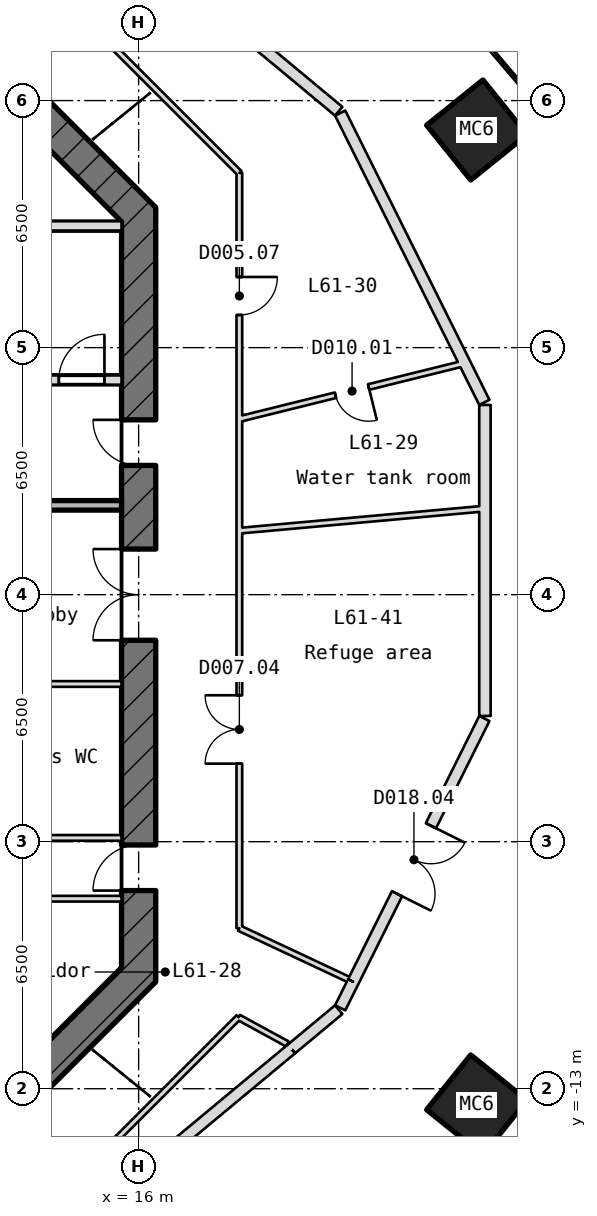
"""IFC4 building model, lengths in metres.
Left out: names, types, materials, properties, quantities, classifications, styles, units other than length and angle.
Written with IfcOpenShell. Run it as: python <this file> out.ifc"""

import sys

from ifc_helpers import new_model, si_unit, direction, frame, frame_2d, origin, place, context, subcontext, project, spatial, polyline, rectangle, outline, extrude, element, fill, save


model = new_model("IFC4")
c1 = context("Model", 3, precision=1e-05, world=origin(), true_north=direction((0.0, 1.0)))
c2 = subcontext(c1, "Body", "Model", "MODEL_VIEW")
j1 = project(units=[si_unit("LENGTHUNIT", "METRE"), si_unit("PLANEANGLEUNIT", "RADIAN")], contexts=[c1])
p1 = place(None, origin())
s1 = spatial("IfcSite", under=j1, at=p1, CompositionType="ELEMENT")
p2 = place(p1, origin())
s2 = spatial("IfcBuilding", under=s1, at=p2, CompositionType="ELEMENT")
p3 = place(p2, frame((0.0, 0.0, 273.1)))
s3 = spatial("IfcBuildingStorey", under=s2, at=p3, CompositionType="ELEMENT", Elevation=273.1)
p4 = place(p3, frame((0.0, 0.0, -0.3)))
e1 = element("IfcColumn", 1, at=p4, inside=s3, PredefinedType="COLUMN", context=c2, shape_type="SweptSolid", body=[
    extrude(outline(polyline([(28.339, 2.783), (25.704, 4.212), (25.273, 6.011), (27.121, 6.454), (29.756, 5.025), (30.186, 3.226), (28.339, 2.783)])), origin(), (0.0, 0.0, 1.0), 6.05),
])
p5 = place(p3, frame((0.0, 0.0, -0.3)))
e2 = element("IfcColumn", 2, at=p5, inside=s3, PredefinedType="COLUMN", context=c2, shape_type="SweptSolid", body=[
    extrude(outline(polyline([(24.738, 10.911), (22.17, 12.208), (21.011, 13.65), (22.491, 14.84), (25.06, 13.543), (26.219, 12.101), (24.738, 10.911)])), origin(), (0.0, 0.0, 1.0), 6.05),
])
p6 = place(p3, frame((0.0, 0.0, -0.3)))
e3 = element("IfcColumn", 3, at=p6, inside=s3, PredefinedType="COLUMN", context=c2, shape_type="SweptSolid", body=[
    extrude(outline(polyline([(25.06, -14.743), (22.491, -13.04), (21.011, -11.85), (22.17, -10.408), (24.738, -12.111), (26.219, -13.302), (25.06, -14.743)])), origin(), (0.0, 0.0, 1.0), 6.05),
])
p7 = place(p3, frame((0.0, 0.0, -0.3)))
e4 = element("IfcColumn", 4, at=p7, inside=s3, PredefinedType="COLUMN", context=c2, shape_type="SweptSolid", body=[
    extrude(outline(polyline([(29.756, -6.225), (27.908, -5.783), (25.273, -4.211), (25.704, -2.412), (27.552, -2.854), (30.186, -4.426), (29.756, -6.225)])), origin(), (0.0, 0.0, 1.0), 6.05),
])
p8 = place(p3, frame((12.868, -13.132, -0.3), z_axis=(0.0, 0.0, 1.0), x_axis=(0.707106781187, 0.707106781187, 0.0)))
e5 = element("IfcWall", 5, at=p8, inside=s3, PredefinedType="SHEAR", context=c2, shape_type="SweptSolid", body=[
    extrude(rectangle(XDim=4.615, YDim=0.9, at=frame_2d((2.308, 0.0))), origin(), (0.0, 0.0, 1.0), 6.05),
])
p9 = place(p3, frame((16.0, -10.186, -0.3), z_axis=(0.0, 0.0, 1.0), x_axis=(0.0, 1.0, 0.0)))
e6 = element("IfcWall", 6, at=p9, inside=s3, PredefinedType="SHEAR", context=c2, shape_type="SweptSolid", body=[
    extrude(rectangle(XDim=20.373, YDim=0.9, at=frame_2d((10.186, 0.0))), origin(), (0.0, 0.0, 1.0), 6.05),
])
p10 = place(p9, frame((8.986, 0.0, 0.3)))
e7 = element("IfcOpeningElement", 7, at=p10, cuts=e6, PredefinedType="OPENING", context=c2, shape_type="SweptSolid", body=[
    extrude(rectangle(XDim=2.4, YDim=2.1, at=frame_2d((1.2, 1.05))), frame((0.0, 0.46, 0.0), z_axis=(0.0, -1.0, 0.0), x_axis=(1.0, 0.0, 0.0)), (0.0, 0.0, 1.0), 0.92),
])
p11 = place(p9, frame((13.586, 0.0, 0.3)))
e8 = element("IfcOpeningElement", 8, at=p11, cuts=e6, PredefinedType="OPENING", context=c2, shape_type="SweptSolid", body=[
    extrude(rectangle(XDim=1.2, YDim=2.1, at=frame_2d((0.6, 1.05))), frame((0.0, 0.46, 0.0), z_axis=(0.0, -1.0, 0.0), x_axis=(1.0, 0.0, 0.0)), (0.0, 0.0, 1.0), 0.92),
])
p12 = place(p9, frame((2.4, 0.0, 0.3)))
e9 = element("IfcOpeningElement", 9, at=p12, cuts=e6, PredefinedType="OPENING", context=c2, shape_type="SweptSolid", body=[
    extrude(rectangle(XDim=1.2, YDim=2.1, at=frame_2d((0.6, 1.05))), frame((0.0, 0.46, 0.0), z_axis=(0.0, -1.0, 0.0), x_axis=(1.0, 0.0, 0.0)), (0.0, 0.0, 1.0), 0.92),
])
p13 = place(p3, frame((16.132, 9.868, -0.3), z_axis=(0.0, 0.0, 1.0), x_axis=(-0.707106781187, 0.707106781187, 0.0)))
e10 = element("IfcWall", 10, at=p13, inside=s3, PredefinedType="SHEAR", context=c2, shape_type="SweptSolid", body=[
    extrude(rectangle(XDim=4.615, YDim=0.9, at=frame_2d((2.308, 0.0))), origin(), (0.0, 0.0, 1.0), 6.05),
])
p14 = place(p3, frame((8.55, -8.0, 0.0), z_axis=(0.0, 0.0, 1.0), x_axis=(1.0, 0.0, 0.0)))
e11 = element("IfcWall", 11, at=p14, inside=s3, PredefinedType="PARTITIONING", context=c2, shape_type="SweptSolid", body=[
    extrude(rectangle(XDim=7.0, YDim=0.15, at=frame_2d((3.5, 0.0))), origin(), (0.0, 0.0, 1.0), 5.75),
])
p15 = place(p14, frame((2.925, 0.0, 0.0)))
e12 = element("IfcOpeningElement", 12, at=p15, cuts=e11, PredefinedType="OPENING", context=c2, shape_type="SweptSolid", body=[
    extrude(rectangle(XDim=1.0, YDim=2.1, at=frame_2d((0.5, 1.05))), frame((0.0, 0.085, 0.0), z_axis=(0.0, -1.0, 0.0), x_axis=(1.0, 0.0, 0.0)), (0.0, 0.0, 1.0), 0.17),
])
p16 = place(p3, frame((8.55, -6.4, 0.0), z_axis=(0.0, 0.0, 1.0), x_axis=(1.0, 0.0, 0.0)))
e13 = element("IfcWall", 13, at=p16, inside=s3, PredefinedType="PARTITIONING", context=c2, shape_type="SweptSolid", body=[
    extrude(rectangle(XDim=7.0, YDim=0.15, at=frame_2d((3.5, 0.0))), origin(), (0.0, 0.0, 1.0), 5.75),
])
p17 = place(p16, frame((2.925, 0.0, 0.0)))
e14 = element("IfcOpeningElement", 14, at=p17, cuts=e13, PredefinedType="OPENING", context=c2, shape_type="SweptSolid", body=[
    extrude(rectangle(XDim=1.0, YDim=2.1, at=frame_2d((0.5, 1.05))), frame((0.0, 0.085, 0.0), z_axis=(0.0, -1.0, 0.0), x_axis=(1.0, 0.0, 0.0)), (0.0, 0.0, 1.0), 0.17),
])
p18 = place(p3, frame((8.4, -2.35, 0.0), z_axis=(0.0, 0.0, 1.0), x_axis=(1.0, 0.0, 0.0)))
e15 = element("IfcWall", 15, at=p18, inside=s3, PredefinedType="PARTITIONING", context=c2, shape_type="SweptSolid", body=[
    extrude(rectangle(XDim=7.15, YDim=0.15, at=frame_2d((3.575, 0.0))), origin(), (0.0, 0.0, 1.0), 5.75),
])
p19 = place(p3, frame((8.4, 2.35, 0.0), z_axis=(0.0, 0.0, 1.0), x_axis=(1.0, 0.0, 0.0)))
e16 = element("IfcWall", 16, at=p19, inside=s3, PredefinedType="STANDARD", context=c2, shape_type="SweptSolid", body=[
    extrude(rectangle(XDim=7.15, YDim=0.25, at=frame_2d((3.575, 0.0))), origin(), (0.0, 0.0, 1.0), 5.75),
])
p20 = place(p3, frame((8.55, 5.65, -0.3), z_axis=(0.0, 0.0, 1.0), x_axis=(1.0, 0.0, 0.0)))
e17 = element("IfcWall", 17, at=p20, inside=s3, PredefinedType="SHEAR", context=c2, shape_type="SweptSolid", body=[
    extrude(rectangle(XDim=7.0, YDim=0.25, at=frame_2d((3.5, 0.0))), origin(), (0.0, 0.0, 1.0), 6.05),
])
p21 = place(p20, frame((5.35, 0.0, 0.3)))
e18 = element("IfcOpeningElement", 18, at=p21, cuts=e17, PredefinedType="OPENING", context=c2, shape_type="SweptSolid", body=[
    extrude(rectangle(XDim=1.2, YDim=2.1, at=frame_2d((0.6, 1.05))), frame((0.0, 0.135, 0.0), z_axis=(0.0, -1.0, 0.0), x_axis=(1.0, 0.0, 0.0)), (0.0, 0.0, 1.0), 0.27),
])
p22 = place(p3, frame((8.55, 9.7, -0.3), z_axis=(0.0, 0.0, 1.0), x_axis=(1.0, 0.0, 0.0)))
e19 = element("IfcWall", 19, at=p22, inside=s3, PredefinedType="SHEAR", context=c2, shape_type="SweptSolid", body=[
    extrude(rectangle(XDim=7.0, YDim=0.25, at=frame_2d((3.5, 0.0))), origin(), (0.0, 0.0, 1.0), 6.05),
])
p23 = place(p3, frame((14.161, -16.824, 0.0), z_axis=(0.0, 0.0, 1.0), x_axis=(0.769037255877, 0.639203957336, 0.0)))
e20 = element("IfcWall", 20, at=p23, inside=s3, PredefinedType="STANDARD", context=c2, shape_type="SweptSolid", body=[
    extrude(rectangle(XDim=7.621, YDim=0.3, at=frame_2d((3.811, 0.0))), origin(), (0.0, 0.0, 1.0), 5.75),
])
p24 = place(p3, frame((21.645, -10.186, 0.0), z_axis=(0.0, 0.0, 1.0), x_axis=(0.4460144846, 0.895025742382, 0.0)))
e21 = element("IfcWall", 21, at=p24, inside=s3, PredefinedType="STANDARD", context=c2, shape_type="SweptSolid", body=[
    extrude(rectangle(XDim=7.74, YDim=0.3, at=frame_2d((3.87, 0.0))), origin(), (0.0, 0.0, 1.0), 5.75),
])
p25 = place(p24, frame((2.587, 0.0, 0.0)))
e22 = element("IfcOpeningElement", 22, at=p25, cuts=e21, PredefinedType="OPENING", context=c2, shape_type="SweptSolid", body=[
    extrude(rectangle(XDim=2.0, YDim=2.1, at=frame_2d((1.0, 1.05))), frame((0.0, 0.16, 0.0), z_axis=(0.0, -1.0, 0.0), x_axis=(1.0, 0.0, 0.0)), (0.0, 0.0, 1.0), 0.32),
])
p26 = place(p3, frame((25.113, -3.192, 0.0), z_axis=(0.0, 0.0, 1.0), x_axis=(0.0, 1.0, 0.0)))
e23 = element("IfcWall", 23, at=p26, inside=s3, PredefinedType="STANDARD", context=c2, shape_type="SweptSolid", body=[
    extrude(rectangle(XDim=8.183, YDim=0.3, at=frame_2d((4.092, 0.0))), origin(), (0.0, 0.0, 1.0), 5.75),
])
p27 = place(p3, frame((25.097, 5.059, 0.0), z_axis=(0.0, 0.0, 1.0), x_axis=(-0.446030602058, 0.895017710455, 0.0)))
e24 = element("IfcWall", 24, at=p27, inside=s3, PredefinedType="STANDARD", context=c2, shape_type="SweptSolid", body=[
    extrude(rectangle(XDim=8.505, YDim=0.3, at=frame_2d((4.253, 0.0))), origin(), (0.0, 0.0, 1.0), 5.75),
])
p28 = place(p3, frame((21.265, 12.719, 0.0), z_axis=(0.0, 0.0, 1.0), x_axis=(-0.769009973498, 0.639236779809, 0.0)))
e25 = element("IfcWall", 25, at=p28, inside=s3, PredefinedType="STANDARD", context=c2, shape_type="SweptSolid", body=[
    extrude(rectangle(XDim=8.291, YDim=0.3, at=frame_2d((4.146, 0.0))), origin(), (0.0, 0.0, 1.0), 5.75),
])
p29 = place(p3, frame((20.022, -11.953, 0.0), z_axis=(0.0, 0.0, 1.0), x_axis=(0.769013258234, 0.63923282821, 0.0)))
e26 = element("IfcWall", 26, at=p29, inside=s3, PredefinedType="STANDARD", context=c2, shape_type="SweptSolid", body=[
    extrude(rectangle(XDim=1.616, YDim=0.3, at=frame_2d((0.808, 0.0))), origin(), (0.0, 0.0, 1.0), 5.75),
])
p30 = place(p3, frame((21.303, -10.871, 0.0), z_axis=(0.0, 0.0, 1.0), x_axis=(0.446193434067, 0.894936544899, 0.0)))
e27 = element("IfcWall", 27, at=p30, inside=s3, PredefinedType="STANDARD", context=c2, shape_type="SweptSolid", body=[
    extrude(rectangle(XDim=0.766, YDim=0.3, at=frame_2d((0.383, 0.0))), origin(), (0.0, 0.0, 1.0), 5.75),
])
p31 = place(p3, frame((18.65, 1.683, 0.0), z_axis=(0.0, 0.0, 1.0), x_axis=(0.995955876616, 0.089843707818, 0.0)))
e28 = element("IfcWall", 28, at=p31, inside=s3, PredefinedType="PARTITIONING", context=c2, shape_type="SweptSolid", body=[
    extrude(rectangle(XDim=6.489, YDim=0.15, at=frame_2d((3.245, 0.0))), origin(), (0.0, 0.0, 1.0), 5.75),
])
p32 = place(p3, frame((18.65, 4.621, 0.0), z_axis=(0.0, 0.0, 1.0), x_axis=(0.970650214712, 0.24049565626, 0.0)))
e29 = element("IfcWall", 29, at=p32, inside=s3, PredefinedType="PARTITIONING", context=c2, shape_type="SweptSolid", body=[
    extrude(rectangle(XDim=6.112, YDim=0.15, at=frame_2d((3.056, 0.0))), origin(), (0.0, 0.0, 1.0), 5.75),
])
p33 = place(p32, frame((2.606, 0.0, 0.0)))
e30 = element("IfcOpeningElement", 30, at=p33, cuts=e29, PredefinedType="OPENING", context=c2, shape_type="SweptSolid", body=[
    extrude(rectangle(XDim=0.9, YDim=2.1, at=frame_2d((0.45, 1.05))), frame((0.0, 0.085, 0.0), z_axis=(0.0, -1.0, 0.0), x_axis=(1.0, 0.0, 0.0)), (0.0, 0.0, 1.0), 0.17),
])
p34 = place(p3, frame((14.098, -15.65, 0.0), z_axis=(0.0, 0.0, 1.0), x_axis=(0.707106781187, 0.707106781187, 0.0)))
e31 = element("IfcWall", 31, at=p34, inside=s3, PredefinedType="PARTITIONING", context=c2, shape_type="SweptSolid", body=[
    extrude(rectangle(XDim=6.406, YDim=0.15, at=frame_2d((3.203, 0.0))), origin(), (0.0, 0.0, 1.0), 5.75),
])
p35 = place(p3, frame((18.65, -8.776, 0.0), z_axis=(0.0, 0.0, 1.0), x_axis=(0.0, 1.0, 0.0)))
e32 = element("IfcWall", 32, at=p35, inside=s3, PredefinedType="PARTITIONING", context=c2, shape_type="SweptSolid", body=[
    extrude(rectangle(XDim=19.874, YDim=0.15, at=frame_2d((9.937, 0.0))), origin(), (0.0, 0.0, 1.0), 5.75),
])
p36 = place(p35, frame((16.135, 0.0, 0.0)))
e33 = element("IfcOpeningElement", 33, at=p36, cuts=e32, PredefinedType="OPENING", context=c2, shape_type="SweptSolid", body=[
    extrude(rectangle(XDim=1.0, YDim=2.1, at=frame_2d((0.5, 1.05))), frame((0.0, 0.085, 0.0), z_axis=(0.0, -1.0, 0.0), x_axis=(1.0, 0.0, 0.0)), (0.0, 0.0, 1.0), 0.17),
])
p37 = place(p35, frame((4.329, 0.0, 0.0)))
e34 = element("IfcOpeningElement", 34, at=p37, cuts=e32, PredefinedType="OPENING", context=c2, shape_type="SweptSolid", body=[
    extrude(rectangle(XDim=1.8, YDim=2.1, at=frame_2d((0.9, 1.05))), frame((0.0, 0.085, 0.0), z_axis=(0.0, -1.0, 0.0), x_axis=(1.0, 0.0, 0.0)), (0.0, 0.0, 1.0), 0.17),
])
p38 = place(p3, frame((18.65, 11.098, 0.0), z_axis=(0.0, 0.0, 1.0), x_axis=(-0.707106781187, 0.707106781187, 0.0)))
e35 = element("IfcWall", 35, at=p38, inside=s3, PredefinedType="PARTITIONING", context=c2, shape_type="SweptSolid", body=[
    extrude(rectangle(XDim=6.438, YDim=0.15, at=frame_2d((3.219, 0.0))), origin(), (0.0, 0.0, 1.0), 5.75),
])
p39 = place(p3, frame((19.913, -11.822, 0.0), z_axis=(0.0, 0.0, 1.0), x_axis=(-0.877749049089, 0.479120659983, 0.0)))
e36 = element("IfcWall", 36, at=p39, inside=s3, PredefinedType="PARTITIONING", context=c2, shape_type="SweptSolid", body=[
    extrude(rectangle(XDim=1.465, YDim=0.15, at=frame_2d((0.732, 0.0))), origin(), (0.0, 0.0, 1.0), 5.75),
])
p40 = place(p3, frame((21.52, -10.123, 0.0), z_axis=(0.0, 0.0, 1.0), x_axis=(-0.905242385039, 0.424895545198, 0.0)))
e37 = element("IfcWall", 37, at=p40, inside=s3, PredefinedType="PARTITIONING", context=c2, shape_type="SweptSolid", body=[
    extrude(rectangle(XDim=3.17, YDim=0.15, at=frame_2d((1.585, 0.0))), origin(), (0.0, 0.0, 1.0), 5.75),
])
p41 = place(p21, origin())
e38 = element("IfcDoor", 38, at=p41, inside=s3, OperationType="SINGLE_SWING_RIGHT", PredefinedType="DOOR", context=c2, shape_type="SweptSolid", body=[
    extrude(rectangle(XDim=1.2, YDim=2.1, at=frame_2d((0.6, 1.05))), frame((0.0, 0.025, 0.0), z_axis=(0.0, -1.0, 0.0), x_axis=(1.0, 0.0, 0.0)), (0.0, 0.0, 1.0), 0.05),
])
fill(e18, e38)
p42 = place(p10, origin())
e39 = element("IfcDoor", 39, at=p42, inside=s3, OperationType="DOUBLE_DOOR_SINGLE_SWING", PredefinedType="DOOR", context=c2, shape_type="SweptSolid", body=[
    extrude(rectangle(XDim=2.4, YDim=2.1, at=frame_2d((1.2, 1.05))), frame((0.0, 0.025, 0.0), z_axis=(0.0, -1.0, 0.0), x_axis=(1.0, 0.0, 0.0)), (0.0, 0.0, 1.0), 0.05),
])
fill(e7, e39)
p43 = place(p11, origin())
e40 = element("IfcDoor", 40, at=p43, inside=s3, OperationType="SINGLE_SWING_RIGHT", PredefinedType="DOOR", context=c2, shape_type="SweptSolid", body=[
    extrude(rectangle(XDim=1.2, YDim=2.1, at=frame_2d((0.6, 1.05))), frame((0.0, 0.025, 0.0), z_axis=(0.0, -1.0, 0.0), x_axis=(1.0, 0.0, 0.0)), (0.0, 0.0, 1.0), 0.05),
])
fill(e8, e40)
p44 = place(p12, origin())
e41 = element("IfcDoor", 41, at=p44, inside=s3, OperationType="SINGLE_SWING_RIGHT", PredefinedType="DOOR", context=c2, shape_type="SweptSolid", body=[
    extrude(rectangle(XDim=1.2, YDim=2.1, at=frame_2d((0.6, 1.05))), frame((0.0, 0.025, 0.0), z_axis=(0.0, -1.0, 0.0), x_axis=(1.0, 0.0, 0.0)), (0.0, 0.0, 1.0), 0.05),
])
fill(e9, e41)
p45 = place(p33, frame((0.9, 0.0, 0.0), z_axis=(0.0, 0.0, 1.0), x_axis=(-1.0, 0.0, 0.0)))
e42 = element("IfcDoor", 42, at=p45, inside=s3, OperationType="SINGLE_SWING_LEFT", PredefinedType="DOOR", context=c2, shape_type="SweptSolid", body=[
    extrude(rectangle(XDim=0.9, YDim=2.1, at=frame_2d((0.45, 1.05))), frame((0.0, 0.025, 0.0), z_axis=(0.0, -1.0, 0.0), x_axis=(1.0, 0.0, 0.0)), (0.0, 0.0, 1.0), 0.05),
])
fill(e30, e42)
p46 = place(p36, frame((1.0, 0.0, 0.0), z_axis=(0.0, 0.0, 1.0), x_axis=(-1.0, 0.0, 0.0)))
e43 = element("IfcDoor", 43, at=p46, inside=s3, OperationType="SINGLE_SWING_LEFT", PredefinedType="DOOR", context=c2, shape_type="SweptSolid", body=[
    extrude(rectangle(XDim=1.0, YDim=2.1, at=frame_2d((0.5, 1.05))), frame((0.0, 0.025, 0.0), z_axis=(0.0, -1.0, 0.0), x_axis=(1.0, 0.0, 0.0)), (0.0, 0.0, 1.0), 0.05),
])
fill(e33, e43)
p47 = place(p37, origin())
e44 = element("IfcDoor", 44, at=p47, inside=s3, OperationType="DOUBLE_DOOR_SINGLE_SWING", PredefinedType="DOOR", context=c2, shape_type="SweptSolid", body=[
    extrude(rectangle(XDim=1.8, YDim=2.1, at=frame_2d((0.9, 1.05))), frame((0.0, 0.025, 0.0), z_axis=(0.0, -1.0, 0.0), x_axis=(1.0, 0.0, 0.0)), (0.0, 0.0, 1.0), 0.05),
])
fill(e34, e44)
p48 = place(p25, frame((2.0, 0.0, 0.0), z_axis=(0.0, 0.0, 1.0), x_axis=(-1.0, 0.0, 0.0)))
e45 = element("IfcDoor", 45, at=p48, inside=s3, OperationType="DOUBLE_DOOR_SINGLE_SWING", PredefinedType="DOOR", context=c2, shape_type="SweptSolid", body=[
    extrude(rectangle(XDim=2.0, YDim=2.1, at=frame_2d((1.0, 1.05))), frame((0.0, 0.025, 0.0), z_axis=(0.0, -1.0, 0.0), x_axis=(1.0, 0.0, 0.0)), (0.0, 0.0, 1.0), 0.05),
])
fill(e22, e45)
save(model, sys.argv[1])
